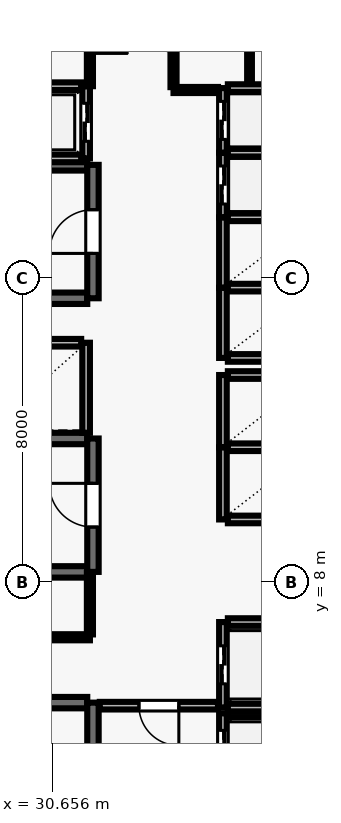
"""IFC4 building model, lengths in metres.
Left out: names, types, materials, properties, quantities, classifications, styles, units other than length and angle.
Written with IfcOpenShell. Run it as: python <this file> out.ifc"""

import sys

from ifc_helpers import new_model, si_unit, direction, frame, frame_2d, origin, place, context, subcontext, project, spatial, rectangle, extrude, element, fill, save


model = new_model("IFC4")
c1 = context("Model", 3, precision=1e-05, world=origin(), true_north=direction((0.0, 1.0)))
c2 = subcontext(c1, "Body", "Model", "MODEL_VIEW")
j1 = project(units=[si_unit("LENGTHUNIT", "METRE"), si_unit("PLANEANGLEUNIT", "RADIAN")], contexts=[c1])
p1 = place(None, origin())
s1 = spatial("IfcSite", under=j1, at=p1, CompositionType="ELEMENT")
p2 = place(p1, origin())
s2 = spatial("IfcBuilding", under=s1, at=p2, CompositionType="ELEMENT")
p3 = place(p2, frame((0.0, 0.0, 111.2)))
s3 = spatial("IfcBuildingStorey", under=s2, at=p3, CompositionType="ELEMENT", Elevation=111.2)
p4 = place(p3, frame((31.58, 4.83, 0.0), z_axis=(0.0, 0.0, 1.0), x_axis=(-1.0, 0.0, 0.0)))
e1 = element("IfcWall", 1, at=p4, inside=s3, PredefinedType="SHEAR", context=c2, shape_type="SweptSolid", body=[
    extrude(rectangle(XDim=8.36, YDim=0.3, at=frame_2d((4.18, 0.0))), origin(), (0.0, 0.0, 1.0), 3.69),
])
p5 = place(p3, frame((31.73, 0.96, 0.0), z_axis=(0.0, 0.0, 1.0), x_axis=(0.0, 1.0, 0.0)))
e2 = element("IfcWall", 2, at=p5, inside=s3, PredefinedType="SHEAR", context=c2, shape_type="SweptSolid", body=[
    extrude(rectangle(XDim=3.87, YDim=0.3, at=frame_2d((1.935, 0.0))), origin(), (0.0, 0.0, 1.0), 3.69),
])
p6 = place(p5, frame((1.54, 0.0, 0.0)))
e3 = element("IfcOpeningElement", 3, at=p6, cuts=e2, PredefinedType="OPENING", context=c2, shape_type="SweptSolid", body=[
    extrude(rectangle(XDim=1.15, YDim=2.15, at=frame_2d((0.575, 1.075))), frame((0.0, 0.16, 0.0), z_axis=(0.0, -1.0, 0.0), x_axis=(1.0, 0.0, 0.0)), (0.0, 0.0, 1.0), 0.32),
])
for number, where, z_axis, x_axis in (
    (4, (31.58, 18.98, 0.0), (0.0, 0.0, 1.0), (-1.0, 0.0, 0.0)),
    (5, (23.22, 15.47, 0.0), (0.0, 0.0, 1.0), (1.0, 0.0, 0.0)),
):
    element("IfcWall", number, at=place(p3, frame(where, z_axis=z_axis, x_axis=x_axis)), inside=s3, PredefinedType="SHEAR", context=c2, shape_type="SweptSolid", body=[
        extrude(rectangle(XDim=8.36, YDim=0.3, at=frame_2d((4.18, 0.0))), origin(), (0.0, 0.0, 1.0), 3.69),
    ])
p7 = place(p3, frame((31.73, 15.47, 0.0), z_axis=(0.0, 0.0, 1.0), x_axis=(0.0, 1.0, 0.0)))
e6 = element("IfcWall", 6, at=p7, inside=s3, PredefinedType="SHEAR", context=c2, shape_type="SweptSolid", body=[
    extrude(rectangle(XDim=3.51, YDim=0.3, at=frame_2d((1.755, 0.0))), origin(), (0.0, 0.0, 1.0), 3.69),
])
p8 = place(p7, frame((1.18, 0.0, 0.0)))
e7 = element("IfcOpeningElement", 7, at=p8, cuts=e6, PredefinedType="OPENING", context=c2, shape_type="SweptSolid", body=[
    extrude(rectangle(XDim=1.15, YDim=2.15, at=frame_2d((0.575, 1.075))), frame((0.0, 0.16, 0.0), z_axis=(0.0, -1.0, 0.0), x_axis=(1.0, 0.0, 0.0)), (0.0, 0.0, 1.0), 0.32),
])
for number, where, z_axis, x_axis in (
    (8, (31.58, 11.78, 0.0), (0.0, 0.0, 1.0), (-1.0, 0.0, 0.0)),
    (9, (23.22, 8.27, 0.0), (0.0, 0.0, 1.0), (1.0, 0.0, 0.0)),
):
    element("IfcWall", number, at=place(p3, frame(where, z_axis=z_axis, x_axis=x_axis)), inside=s3, PredefinedType="SHEAR", context=c2, shape_type="SweptSolid", body=[
        extrude(rectangle(XDim=8.36, YDim=0.3, at=frame_2d((4.18, 0.0))), origin(), (0.0, 0.0, 1.0), 3.69),
    ])
p9 = place(p3, frame((31.73, 8.27, 0.0), z_axis=(0.0, 0.0, 1.0), x_axis=(0.0, 1.0, 0.0)))
e10 = element("IfcWall", 10, at=p9, inside=s3, PredefinedType="SHEAR", context=c2, shape_type="SweptSolid", body=[
    extrude(rectangle(XDim=3.51, YDim=0.3, at=frame_2d((1.755, 0.0))), origin(), (0.0, 0.0, 1.0), 3.69),
])
p10 = place(p9, frame((1.18, 0.0, 0.0)))
e11 = element("IfcOpeningElement", 11, at=p10, cuts=e10, PredefinedType="OPENING", context=c2, shape_type="SweptSolid", body=[
    extrude(rectangle(XDim=1.15, YDim=2.15, at=frame_2d((0.575, 1.075))), frame((0.0, 0.16, 0.0), z_axis=(0.0, -1.0, 0.0), x_axis=(1.0, 0.0, 0.0)), (0.0, 0.0, 1.0), 0.32),
])
p11 = place(p3, frame((35.15, 4.55, 0.0), z_axis=(0.0, 0.0, 1.0), x_axis=(0.0, -1.0, 0.0)))
e12 = element("IfcWall", 12, at=p11, inside=s3, PredefinedType="SOLIDWALL", context=c2, shape_type="SweptSolid", body=[
    extrude(rectangle(XDim=2.1, YDim=0.2, at=frame_2d((1.05, 0.0))), origin(), (0.0, 0.0, 1.0), 3.69),
])
p12 = place(p11, frame((0.45, 0.0, 0.0)))
e13 = element("IfcOpeningElement", 13, at=p12, cuts=e12, PredefinedType="OPENING", context=c2, shape_type="SweptSolid", body=[
    extrude(rectangle(XDim=1.2, YDim=2.15, at=frame_2d((0.6, 1.075))), frame((0.0, 0.11, 0.0), z_axis=(0.0, -1.0, 0.0), x_axis=(1.0, 0.0, 0.0)), (0.0, 0.0, 1.0), 0.22),
])
p13 = place(p3, frame((37.42, 4.55, 0.0), z_axis=(0.0, 0.0, 1.0), x_axis=(-1.0, 0.0, 0.0)))
e14 = element("IfcWall", 14, at=p13, inside=s3, PredefinedType="SOLIDWALL", context=c2, shape_type="SweptSolid", body=[
    extrude(rectangle(XDim=2.14, YDim=0.2, at=frame_2d((1.07, 0.0))), origin(), (0.0, 0.0, 1.0), 3.69),
])
p14 = place(p3, frame((35.15, 6.95, 0.0), z_axis=(0.0, 0.0, 1.0), x_axis=(0.0, -1.0, 0.0)))
e15 = element("IfcWall", 15, at=p14, inside=s3, PredefinedType="SOLIDWALL", context=c2, shape_type="SweptSolid", body=[
    extrude(rectangle(XDim=2.25, YDim=0.2, at=frame_2d((1.125, 0.0))), origin(), (0.0, 0.0, 1.0), 3.69),
])
p15 = place(p14, frame((0.625, 0.0, 0.0)))
e16 = element("IfcOpeningElement", 16, at=p15, cuts=e15, PredefinedType="OPENING", context=c2, shape_type="SweptSolid", body=[
    extrude(rectangle(XDim=1.0, YDim=2.1, at=frame_2d((0.5, 1.05))), frame((0.0, 0.11, 0.0), z_axis=(0.0, -1.0, 0.0), x_axis=(1.0, 0.0, 0.0)), (0.0, 0.0, 1.0), 0.22),
])
for number, where, z_axis, x_axis in (
    (17, (35.28, 4.7, 0.0), (0.0, 0.0, 1.0), (1.0, 0.0, 0.0)),
    (18, (37.42, 6.95, 0.0), (0.0, 0.0, 1.0), (-1.0, 0.0, 0.0)),
):
    element("IfcWall", number, at=place(p3, frame(where, z_axis=z_axis, x_axis=x_axis)), inside=s3, PredefinedType="SOLIDWALL", context=c2, shape_type="SweptSolid", body=[
        extrude(rectangle(XDim=2.14, YDim=0.2, at=frame_2d((1.07, 0.0))), origin(), (0.0, 0.0, 1.0), 3.69),
    ])
p16 = place(p3, frame((35.15, 11.55, 0.0), z_axis=(0.0, 0.0, 1.0), x_axis=(0.0, -1.0, 0.0)))
e19 = element("IfcWall", 19, at=p16, inside=s3, PredefinedType="SOLIDWALL", context=c2, shape_type="SweptSolid", body=[
    extrude(rectangle(XDim=1.9, YDim=0.2, at=frame_2d((0.95, 0.0))), origin(), (0.0, 0.0, 1.0), 3.69),
])
for number, where, z_axis, x_axis in (
    (20, (35.28, 9.65, 0.0), (0.0, 0.0, 1.0), (1.0, 0.0, 0.0)),
    (21, (37.42, 11.55, 0.0), (0.0, 0.0, 1.0), (-1.0, 0.0, 0.0)),
):
    element("IfcWall", number, at=place(p3, frame(where, z_axis=z_axis, x_axis=x_axis)), inside=s3, PredefinedType="SOLIDWALL", context=c2, shape_type="SweptSolid", body=[
        extrude(rectangle(XDim=2.14, YDim=0.2, at=frame_2d((1.07, 0.0))), origin(), (0.0, 0.0, 1.0), 3.69),
    ])
p17 = place(p3, frame((35.15, 13.45, 0.0), z_axis=(0.0, 0.0, 1.0), x_axis=(0.0, -1.0, 0.0)))
e22 = element("IfcWall", 22, at=p17, inside=s3, PredefinedType="SOLIDWALL", context=c2, shape_type="SweptSolid", body=[
    extrude(rectangle(XDim=1.9, YDim=0.2, at=frame_2d((0.95, 0.0))), origin(), (0.0, 0.0, 1.0), 3.69),
])
p18 = place(p3, frame((37.42, 13.45, 0.0), z_axis=(0.0, 0.0, 1.0), x_axis=(-1.0, 0.0, 0.0)))
e23 = element("IfcWall", 23, at=p18, inside=s3, PredefinedType="SOLIDWALL", context=c2, shape_type="SweptSolid", body=[
    extrude(rectangle(XDim=2.14, YDim=0.2, at=frame_2d((1.07, 0.0))), origin(), (0.0, 0.0, 1.0), 3.69),
])
p19 = place(p3, frame((31.55, 11.93, 0.0), z_axis=(0.0, 0.0, 1.0), x_axis=(0.0, 1.0, 0.0)))
e24 = element("IfcWall", 24, at=p19, inside=s3, PredefinedType="SOLIDWALL", context=c2, shape_type="SweptSolid", body=[
    extrude(rectangle(XDim=2.37, YDim=0.2, at=frame_2d((1.185, 0.0))), origin(), (0.0, 0.0, 1.0), 3.69),
])
p20 = place(p3, frame((31.42, 14.3, 0.0), z_axis=(0.0, 0.0, 1.0), x_axis=(-1.0, 0.0, 0.0)))
e25 = element("IfcWall", 25, at=p20, inside=s3, PredefinedType="SOLIDWALL", context=c2, shape_type="SweptSolid", body=[
    extrude(rectangle(XDim=2.44, YDim=0.2, at=frame_2d((1.22, 0.0))), origin(), (0.0, 0.0, 1.0), 3.69),
])
p21 = place(p3, frame((35.15, 15.75, 0.0), z_axis=(0.0, 0.0, 1.0), x_axis=(0.0, -1.0, 0.0)))
e26 = element("IfcWall", 26, at=p21, inside=s3, PredefinedType="SOLIDWALL", context=c2, shape_type="SweptSolid", body=[
    extrude(rectangle(XDim=1.85, YDim=0.2, at=frame_2d((0.925, 0.0))), origin(), (0.0, 0.0, 1.0), 3.69),
])
for number, where, z_axis, x_axis in (
    (27, (35.28, 13.9, 0.0), (0.0, 0.0, 1.0), (1.0, 0.0, 0.0)),
    (28, (37.42, 15.75, 0.0), (0.0, 0.0, 1.0), (-1.0, 0.0, 0.0)),
):
    element("IfcWall", number, at=place(p3, frame(where, z_axis=z_axis, x_axis=x_axis)), inside=s3, PredefinedType="SOLIDWALL", context=c2, shape_type="SweptSolid", body=[
        extrude(rectangle(XDim=2.14, YDim=0.2, at=frame_2d((1.07, 0.0))), origin(), (0.0, 0.0, 1.0), 3.69),
    ])
p22 = place(p3, frame((35.15, 17.6, 0.0), z_axis=(0.0, 0.0, 1.0), x_axis=(0.0, -1.0, 0.0)))
e29 = element("IfcWall", 29, at=p22, inside=s3, PredefinedType="SOLIDWALL", context=c2, shape_type="SweptSolid", body=[
    extrude(rectangle(XDim=1.85, YDim=0.2, at=frame_2d((0.925, 0.0))), origin(), (0.0, 0.0, 1.0), 3.69),
])
p23 = place(p3, frame((37.42, 17.6, 0.0), z_axis=(0.0, 0.0, 1.0), x_axis=(-1.0, 0.0, 0.0)))
e30 = element("IfcWall", 30, at=p23, inside=s3, PredefinedType="SOLIDWALL", context=c2, shape_type="SweptSolid", body=[
    extrude(rectangle(XDim=2.14, YDim=0.2, at=frame_2d((1.07, 0.0))), origin(), (0.0, 0.0, 1.0), 3.69),
])
p24 = place(p3, frame((35.15, 19.3, 0.0), z_axis=(0.0, 0.0, 1.0), x_axis=(0.0, -1.0, 0.0)))
e31 = element("IfcWall", 31, at=p24, inside=s3, PredefinedType="SOLIDWALL", context=c2, shape_type="SweptSolid", body=[
    extrude(rectangle(XDim=1.7, YDim=0.2, at=frame_2d((0.85, 0.0))), origin(), (0.0, 0.0, 1.0), 3.69),
])
p25 = place(p24, frame((0.35, 0.0, 0.0)))
e32 = element("IfcOpeningElement", 32, at=p25, cuts=e31, PredefinedType="OPENING", context=c2, shape_type="SweptSolid", body=[
    extrude(rectangle(XDim=1.0, YDim=2.1, at=frame_2d((0.5, 1.05))), frame((0.0, 0.11, 0.0), z_axis=(0.0, -1.0, 0.0), x_axis=(1.0, 0.0, 0.0)), (0.0, 0.0, 1.0), 0.22),
])
p26 = place(p3, frame((37.42, 19.3, 0.0), z_axis=(0.0, 0.0, 1.0), x_axis=(-1.0, 0.0, 0.0)))
e33 = element("IfcWall", 33, at=p26, inside=s3, PredefinedType="SOLIDWALL", context=c2, shape_type="SweptSolid", body=[
    extrude(rectangle(XDim=2.14, YDim=0.2, at=frame_2d((1.07, 0.0))), origin(), (0.0, 0.0, 1.0), 3.69),
])
p27 = place(p3, frame((35.15, 21.0, 0.0), z_axis=(0.0, 0.0, 1.0), x_axis=(0.0, -1.0, 0.0)))
e34 = element("IfcWall", 34, at=p27, inside=s3, PredefinedType="SOLIDWALL", context=c2, shape_type="SweptSolid", body=[
    extrude(rectangle(XDim=1.7, YDim=0.2, at=frame_2d((0.85, 0.0))), origin(), (0.0, 0.0, 1.0), 3.69),
])
p28 = place(p27, frame((0.35, 0.0, 0.0)))
e35 = element("IfcOpeningElement", 35, at=p28, cuts=e34, PredefinedType="OPENING", context=c2, shape_type="SweptSolid", body=[
    extrude(rectangle(XDim=1.0, YDim=2.1, at=frame_2d((0.5, 1.05))), frame((0.0, 0.11, 0.0), z_axis=(0.0, -1.0, 0.0), x_axis=(1.0, 0.0, 0.0)), (0.0, 0.0, 1.0), 0.22),
])
p29 = place(p3, frame((37.42, 21.0, 0.0), z_axis=(0.0, 0.0, 1.0), x_axis=(-1.0, 0.0, 0.0)))
e36 = element("IfcWall", 36, at=p29, inside=s3, PredefinedType="SOLIDWALL", context=c2, shape_type="SweptSolid", body=[
    extrude(rectangle(XDim=2.14, YDim=0.2, at=frame_2d((1.07, 0.0))), origin(), (0.0, 0.0, 1.0), 3.69),
])
p30 = place(p3, frame((31.55, 19.15, 0.0), z_axis=(0.0, 0.0, 1.0), x_axis=(0.0, 1.0, 0.0)))
e37 = element("IfcWall", 37, at=p30, inside=s3, PredefinedType="SOLIDWALL", context=c2, shape_type="SweptSolid", body=[
    extrude(rectangle(XDim=1.9, YDim=0.2, at=frame_2d((0.95, 0.0))), origin(), (0.0, 0.0, 1.0), 3.69),
])
p31 = place(p30, frame((0.45, 0.0, 0.0)))
e38 = element("IfcOpeningElement", 38, at=p31, cuts=e37, PredefinedType="OPENING", context=c2, shape_type="SweptSolid", body=[
    extrude(rectangle(XDim=1.0, YDim=2.1, at=frame_2d((0.5, 1.05))), frame((0.0, 0.11, 0.0), z_axis=(0.0, -1.0, 0.0), x_axis=(1.0, 0.0, 0.0)), (0.0, 0.0, 1.0), 0.22),
])
for number, where, z_axis, x_axis in (
    (39, (28.98, 19.15, 0.0), (0.0, 0.0, 1.0), (1.0, 0.0, 0.0)),
    (40, (31.42, 21.05, 0.0), (0.0, 0.0, 1.0), (-1.0, 0.0, 0.0)),
):
    element("IfcWall", number, at=place(p3, frame(where, z_axis=z_axis, x_axis=x_axis)), inside=s3, PredefinedType="SOLIDWALL", context=c2, shape_type="SweptSolid", body=[
        extrude(rectangle(XDim=2.44, YDim=0.2, at=frame_2d((1.22, 0.0))), origin(), (0.0, 0.0, 1.0), 3.69),
    ])
p32 = place(p3, frame((31.65, 6.55, 0.0), z_axis=(0.0, 0.0, 1.0), x_axis=(-1.0, 0.0, 0.0)))
e41 = element("IfcWall", 41, at=p32, inside=s3, PredefinedType="PARTITIONING", context=c2, shape_type="SweptSolid", body=[
    extrude(rectangle(XDim=4.75, YDim=0.16, at=frame_2d((2.375, 0.0))), origin(), (0.0, 0.0, 1.0), 3.69),
])
p33 = place(p32, frame((1.935, 0.0, 0.0)))
e42 = element("IfcOpeningElement", 42, at=p33, cuts=e41, PredefinedType="OPENING", context=c2, shape_type="SweptSolid", body=[
    extrude(rectangle(XDim=0.88, YDim=2.1, at=frame_2d((0.44, 1.05))), frame((0.0, 0.09, 0.0), z_axis=(0.0, -1.0, 0.0), x_axis=(1.0, 0.0, 0.0)), (0.0, 0.0, 1.0), 0.18),
])
p34 = place(p3, frame((35.02, 4.75, 0.0), z_axis=(0.0, 0.0, 1.0), x_axis=(-1.0, 0.0, 0.0)))
e43 = element("IfcWall", 43, at=p34, inside=s3, PredefinedType="SOLIDWALL", context=c2, shape_type="SweptSolid", body=[
    extrude(rectangle(XDim=3.11, YDim=0.2, at=frame_2d((1.555, 0.0))), origin(), (0.0, 0.0, 1.0), 3.69),
])
p35 = place(p34, frame((1.03, 0.0, 0.0)))
e44 = element("IfcOpeningElement", 44, at=p35, cuts=e43, PredefinedType="OPENING", context=c2, shape_type="SweptSolid", body=[
    extrude(rectangle(XDim=1.05, YDim=2.15, at=frame_2d((0.525, 1.075))), frame((0.0, 0.11, 0.0), z_axis=(0.0, -1.0, 0.0), x_axis=(1.0, 0.0, 0.0)), (0.0, 0.0, 1.0), 0.22),
])
p36 = place(p3, frame((35.02, 20.95, 0.0), z_axis=(0.0, 0.0, 1.0), x_axis=(-1.0, 0.0, 0.0)))
e45 = element("IfcWall", 45, at=p36, inside=s3, PredefinedType="PARTITIONING", context=c2, shape_type="SweptSolid", body=[
    extrude(rectangle(XDim=1.17, YDim=0.16, at=frame_2d((0.585, 0.0))), origin(), (0.0, 0.0, 1.0), 3.69),
])
p37 = place(p3, frame((31.65, 8.24, 0.0), z_axis=(0.0, 0.0, 1.0), x_axis=(0.0, -1.0, 0.0)))
e46 = element("IfcWall", 46, at=p37, inside=s3, PredefinedType="PARTITIONING", context=c2, shape_type="SweptSolid", body=[
    extrude(rectangle(XDim=1.615, YDim=0.16, at=frame_2d((0.808, 0.0))), origin(), (0.0, 0.0, 1.0), 3.69),
])
p38 = place(p3, frame((31.65, 23.775, 0.0), z_axis=(0.0, 0.0, 1.0), x_axis=(0.0, -1.0, 0.0)))
e47 = element("IfcWall", 47, at=p38, inside=s3, PredefinedType="PARTITIONING", context=c2, shape_type="SweptSolid", body=[
    extrude(rectangle(XDim=2.725, YDim=0.16, at=frame_2d((1.362, 0.0))), origin(), (0.0, 0.0, 1.0), 3.69),
])
p39 = place(p38, frame((0.862, 0.0, 0.0)))
e48 = element("IfcOpeningElement", 48, at=p39, cuts=e47, PredefinedType="OPENING", context=c2, shape_type="SweptSolid", body=[
    extrude(rectangle(XDim=1.0, YDim=2.1, at=frame_2d((0.5, 1.05))), frame((0.0, 0.09, 0.0), z_axis=(0.0, -1.0, 0.0), x_axis=(1.0, 0.0, 0.0)), (0.0, 0.0, 1.0), 0.18),
])
p40 = place(p3, frame((33.85, 21.025, 0.0), z_axis=(0.0, 0.0, 1.0), x_axis=(0.0, 1.0, 0.0)))
e49 = element("IfcWall", 49, at=p40, inside=s3, PredefinedType="PARTITIONING", context=c2, shape_type="SweptSolid", body=[
    extrude(rectangle(XDim=2.75, YDim=0.16, at=frame_2d((1.375, 0.0))), origin(), (0.0, 0.0, 1.0), 3.69),
])
p41 = place(p40, frame((0.925, 0.0, 0.0)))
e50 = element("IfcOpeningElement", 50, at=p41, cuts=e49, PredefinedType="OPENING", context=c2, shape_type="SweptSolid", body=[
    extrude(rectangle(XDim=0.9, YDim=2.1, at=frame_2d((0.45, 1.05))), frame((0.0, 0.09, 0.0), z_axis=(0.0, -1.0, 0.0), x_axis=(1.0, 0.0, 0.0)), (0.0, 0.0, 1.0), 0.18),
])
p42 = place(p3, frame((35.85, 21.13, 0.0), z_axis=(0.0, 0.0, 1.0), x_axis=(0.0, 1.0, 0.0)))
e51 = element("IfcWall", 51, at=p42, inside=s3, PredefinedType="PARTITIONING", context=c2, shape_type="SweptSolid", body=[
    extrude(rectangle(XDim=2.645, YDim=0.125, at=frame_2d((1.323, 0.0))), origin(), (0.0, 0.0, 1.0), 3.69),
])
p43 = place(p42, frame((0.872, 0.0, 0.0)))
e52 = element("IfcOpeningElement", 52, at=p43, cuts=e51, PredefinedType="OPENING", context=c2, shape_type="SweptSolid", body=[
    extrude(rectangle(XDim=0.9, YDim=2.1, at=frame_2d((0.45, 1.05))), frame((0.0, 0.073, 0.0), z_axis=(0.0, -1.0, 0.0), x_axis=(1.0, 0.0, 0.0)), (0.0, 0.0, 1.0), 0.145),
])
p44 = place(p8, origin())
e53 = element("IfcDoor", 53, at=p44, inside=s3, OperationType="SINGLE_SWING_LEFT", PredefinedType="DOOR", context=c2, shape_type="SweptSolid", body=[
    extrude(rectangle(XDim=1.15, YDim=2.15, at=frame_2d((0.575, 1.075))), frame((0.0, 0.025, 0.0), z_axis=(0.0, -1.0, 0.0), x_axis=(1.0, 0.0, 0.0)), (0.0, 0.0, 1.0), 0.05),
])
fill(e7, e53)
p45 = place(p10, origin())
e54 = element("IfcDoor", 54, at=p45, inside=s3, OperationType="SINGLE_SWING_RIGHT", PredefinedType="DOOR", context=c2, shape_type="SweptSolid", body=[
    extrude(rectangle(XDim=1.15, YDim=2.15, at=frame_2d((0.575, 1.075))), frame((0.0, 0.025, 0.0), z_axis=(0.0, -1.0, 0.0), x_axis=(1.0, 0.0, 0.0)), (0.0, 0.0, 1.0), 0.05),
])
fill(e11, e54)
p46 = place(p12, origin())
e55 = element("IfcDoor", 55, at=p46, inside=s3, OperationType="DOUBLE_DOOR_SLIDING", PredefinedType="DOOR", context=c2, shape_type="SweptSolid", body=[
    extrude(rectangle(XDim=1.2, YDim=2.15, at=frame_2d((0.6, 1.075))), frame((0.0, 0.025, 0.0), z_axis=(0.0, -1.0, 0.0), x_axis=(1.0, 0.0, 0.0)), (0.0, 0.0, 1.0), 0.05),
])
fill(e13, e55)
p47 = place(p15, origin())
e56 = element("IfcDoor", 56, at=p47, inside=s3, OperationType="DOUBLE_DOOR_SLIDING", PredefinedType="DOOR", context=c2, shape_type="SweptSolid", body=[
    extrude(rectangle(XDim=1.0, YDim=2.1, at=frame_2d((0.5, 1.05))), frame((0.0, 0.025, 0.0), z_axis=(0.0, -1.0, 0.0), x_axis=(1.0, 0.0, 0.0)), (0.0, 0.0, 1.0), 0.05),
])
fill(e16, e56)
p48 = place(p25, origin())
e57 = element("IfcDoor", 57, at=p48, inside=s3, OperationType="DOUBLE_DOOR_SLIDING", PredefinedType="DOOR", context=c2, shape_type="SweptSolid", body=[
    extrude(rectangle(XDim=1.0, YDim=2.1, at=frame_2d((0.5, 1.05))), frame((0.0, 0.025, 0.0), z_axis=(0.0, -1.0, 0.0), x_axis=(1.0, 0.0, 0.0)), (0.0, 0.0, 1.0), 0.05),
])
fill(e32, e57)
p49 = place(p28, origin())
e58 = element("IfcDoor", 58, at=p49, inside=s3, OperationType="DOUBLE_DOOR_SLIDING", PredefinedType="DOOR", context=c2, shape_type="SweptSolid", body=[
    extrude(rectangle(XDim=1.0, YDim=2.1, at=frame_2d((0.5, 1.05))), frame((0.0, 0.025, 0.0), z_axis=(0.0, -1.0, 0.0), x_axis=(1.0, 0.0, 0.0)), (0.0, 0.0, 1.0), 0.05),
])
fill(e35, e58)
p50 = place(p31, origin())
e59 = element("IfcDoor", 59, at=p50, inside=s3, OperationType="DOUBLE_DOOR_SLIDING", PredefinedType="DOOR", context=c2, shape_type="SweptSolid", body=[
    extrude(rectangle(XDim=1.0, YDim=2.1, at=frame_2d((0.5, 1.05))), frame((0.0, 0.025, 0.0), z_axis=(0.0, -1.0, 0.0), x_axis=(1.0, 0.0, 0.0)), (0.0, 0.0, 1.0), 0.05),
])
fill(e38, e59)
p51 = place(p35, origin())
e60 = element("IfcDoor", 60, at=p51, inside=s3, OperationType="SINGLE_SWING_LEFT", PredefinedType="DOOR", context=c2, shape_type="SweptSolid", body=[
    extrude(rectangle(XDim=1.05, YDim=2.15, at=frame_2d((0.525, 1.075))), frame((0.0, 0.025, 0.0), z_axis=(0.0, -1.0, 0.0), x_axis=(1.0, 0.0, 0.0)), (0.0, 0.0, 1.0), 0.05),
])
fill(e44, e60)
p52 = place(p39, origin())
e61 = element("IfcDoor", 61, at=p52, inside=s3, OperationType="SINGLE_SWING_RIGHT", PredefinedType="DOOR", context=c2, shape_type="SweptSolid", body=[
    extrude(rectangle(XDim=1.0, YDim=2.1, at=frame_2d((0.5, 1.05))), frame((0.0, 0.025, 0.0), z_axis=(0.0, -1.0, 0.0), x_axis=(1.0, 0.0, 0.0)), (0.0, 0.0, 1.0), 0.05),
])
fill(e48, e61)
save(model, sys.argv[1])
